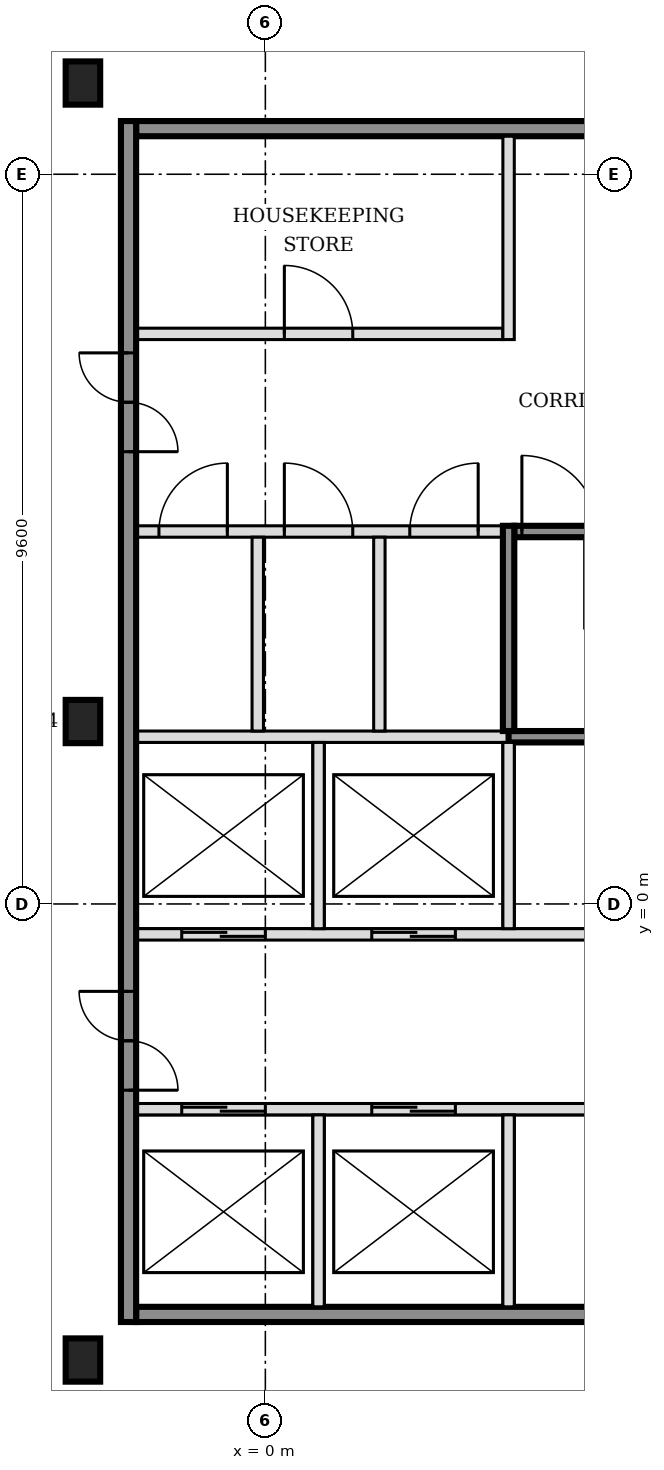
"""IFC4 building model, lengths in metres.
Left out: names, types, materials, properties, quantities, classifications, styles, units other than length and angle.
Written with IfcOpenShell. Run it as: python <this file> out.ifc"""

import sys

from ifc_helpers import new_model, si_unit, direction, frame, frame_2d, origin, origin_2d, place, context, subcontext, project, spatial, rectangle, i_section, extrude, element, fill, save


model = new_model("IFC4")
c1 = context("Model", 3, precision=1e-05, world=origin(), true_north=direction((0.0, 1.0)))
c2 = subcontext(c1, "Body", "Model", "MODEL_VIEW")
j1 = project(units=[si_unit("LENGTHUNIT", "METRE"), si_unit("PLANEANGLEUNIT", "RADIAN")], contexts=[c1])
p1 = place(None, origin())
s1 = spatial("IfcSite", under=j1, at=p1, CompositionType="ELEMENT")
p2 = place(p1, origin())
s2 = spatial("IfcBuilding", under=s1, at=p2, CompositionType="ELEMENT")
p3 = place(p2, frame((0.0, 0.0, 30.6)))
s3 = spatial("IfcBuildingStorey", under=s2, at=p3, CompositionType="ELEMENT", Elevation=30.6)
for number, where, z_axis, x_axis in (
    (1, (-2.4, -6.0, -0.2), (0.0, 0.0, 1.0), (1.0, 0.0, 0.0)),
    (2, (-2.4, 2.4, -0.2), (0.0, 0.0, 1.0), (1.0, 0.0, 0.0)),
    (3, (-2.4, 10.8, -0.2), (0.0, 0.0, 1.0), (1.0, 0.0, 0.0)),
):
    element("IfcColumn", number, at=place(p3, frame(where, z_axis=z_axis, x_axis=x_axis)), inside=s3, PredefinedType="COLUMN", context=c2, shape_type="SweptSolid", body=[
        extrude(i_section(OverallWidth=0.454, OverallDepth=0.569, WebThickness=0.078, FlangeThickness=0.125, FilletRadius=0.015, at=origin_2d()), origin(), (0.0, 0.0, 1.0), 4.8),
    ])
p4 = place(p3, frame((-1.7, -5.4, 0.0), z_axis=(0.0, 0.0, 1.0), x_axis=(1.0, 0.0, 0.0)))
e4 = element("IfcWall", 4, at=p4, inside=s3, PredefinedType="SOLIDWALL", context=c2, shape_type="SweptSolid", body=[
    extrude(rectangle(XDim=7.9, YDim=0.2, at=frame_2d((3.95, 0.0))), origin(), (0.0, 0.0, 1.0), 4.6),
])
p5 = place(p3, frame((-1.7, -2.7, 0.0), z_axis=(0.0, 0.0, 1.0), x_axis=(1.0, 0.0, 0.0)))
e5 = element("IfcWall", 5, at=p5, inside=s3, PredefinedType="SOLIDWALL", context=c2, shape_type="SweptSolid", body=[
    extrude(rectangle(XDim=7.9, YDim=0.15, at=frame_2d((3.95, 0.0))), origin(), (0.0, 0.0, 1.0), 4.6),
])
p6 = place(p5, frame((0.6, 0.0, 0.0)))
e6 = element("IfcOpeningElement", 6, at=p6, cuts=e5, PredefinedType="OPENING", context=c2, shape_type="SweptSolid", body=[
    extrude(rectangle(XDim=1.1, YDim=2.1, at=frame_2d((0.55, 1.05))), frame((0.0, 0.085, 0.0), z_axis=(0.0, -1.0, 0.0), x_axis=(1.0, 0.0, 0.0)), (0.0, 0.0, 1.0), 0.17),
])
p7 = place(p5, frame((3.1, 0.0, 0.0)))
e7 = element("IfcOpeningElement", 7, at=p7, cuts=e5, PredefinedType="OPENING", context=c2, shape_type="SweptSolid", body=[
    extrude(rectangle(XDim=1.1, YDim=2.1, at=frame_2d((0.55, 1.05))), frame((0.0, 0.085, 0.0), z_axis=(0.0, -1.0, 0.0), x_axis=(1.0, 0.0, 0.0)), (0.0, 0.0, 1.0), 0.17),
])
p8 = place(p3, frame((-1.7, -0.4, 0.0), z_axis=(0.0, 0.0, 1.0), x_axis=(1.0, 0.0, 0.0)))
e8 = element("IfcWall", 8, at=p8, inside=s3, PredefinedType="SOLIDWALL", context=c2, shape_type="SweptSolid", body=[
    extrude(rectangle(XDim=15.925, YDim=0.15, at=frame_2d((7.962, 0.0))), origin(), (0.0, 0.0, 1.0), 4.6),
])
p9 = place(p8, frame((0.6, 0.0, 0.0)))
e9 = element("IfcOpeningElement", 9, at=p9, cuts=e8, PredefinedType="OPENING", context=c2, shape_type="SweptSolid", body=[
    extrude(rectangle(XDim=1.1, YDim=2.1, at=frame_2d((0.55, 1.05))), frame((0.0, 0.085, 0.0), z_axis=(0.0, -1.0, 0.0), x_axis=(1.0, 0.0, 0.0)), (0.0, 0.0, 1.0), 0.17),
])
p10 = place(p8, frame((3.1, 0.0, 0.0)))
e10 = element("IfcOpeningElement", 10, at=p10, cuts=e8, PredefinedType="OPENING", context=c2, shape_type="SweptSolid", body=[
    extrude(rectangle(XDim=1.1, YDim=2.1, at=frame_2d((0.55, 1.05))), frame((0.0, 0.085, 0.0), z_axis=(0.0, -1.0, 0.0), x_axis=(1.0, 0.0, 0.0)), (0.0, 0.0, 1.0), 0.17),
])
p11 = place(p8, frame((11.575, 0.0, 0.0)))
e11 = element("IfcOpeningElement", 11, at=p11, cuts=e8, PredefinedType="OPENING", context=c2, shape_type="SweptSolid", body=[
    extrude(rectangle(XDim=1.2, YDim=2.1, at=frame_2d((0.6, 1.05))), frame((0.0, 0.085, 0.0), z_axis=(0.0, -1.0, 0.0), x_axis=(1.0, 0.0, 0.0)), (0.0, 0.0, 1.0), 0.17),
])
p12 = place(p8, frame((14.125, 0.0, 0.0)))
e12 = element("IfcOpeningElement", 12, at=p12, cuts=e8, PredefinedType="OPENING", context=c2, shape_type="SweptSolid", body=[
    extrude(rectangle(XDim=1.2, YDim=2.1, at=frame_2d((0.6, 1.05))), frame((0.0, 0.085, 0.0), z_axis=(0.0, -1.0, 0.0), x_axis=(1.0, 0.0, 0.0)), (0.0, 0.0, 1.0), 0.17),
])
p13 = place(p3, frame((-1.7, 2.2, 0.0), z_axis=(0.0, 0.0, 1.0), x_axis=(1.0, 0.0, 0.0)))
e13 = element("IfcWall", 13, at=p13, inside=s3, PredefinedType="SOLIDWALL", context=c2, shape_type="SweptSolid", body=[
    extrude(rectangle(XDim=4.9, YDim=0.15, at=frame_2d((2.45, 0.0))), origin(), (0.0, 0.0, 1.0), 4.6),
])
p14 = place(p3, frame((3.2, 2.2, 0.0), z_axis=(0.0, 0.0, 1.0), x_axis=(1.0, 0.0, 0.0)))
e14 = element("IfcWall", 14, at=p14, inside=s3, PredefinedType="SOLIDWALL", context=c2, shape_type="SweptSolid", body=[
    extrude(rectangle(XDim=6.5, YDim=0.15, at=frame_2d((3.25, 0.0))), origin(), (0.0, 0.0, 1.0), 4.6),
])
p15 = place(p3, frame((-1.7, 4.9, 0.0), z_axis=(0.0, 0.0, 1.0), x_axis=(1.0, 0.0, 0.0)))
e15 = element("IfcWall", 15, at=p15, inside=s3, PredefinedType="PARTITIONING", context=c2, shape_type="SweptSolid", body=[
    extrude(rectangle(XDim=4.825, YDim=0.15, at=frame_2d((2.413, 0.0))), origin(), (0.0, 0.0, 1.0), 4.6),
])
p16 = place(p15, frame((0.3, 0.0, 0.0)))
e16 = element("IfcOpeningElement", 16, at=p16, cuts=e15, PredefinedType="OPENING", context=c2, shape_type="SweptSolid", body=[
    extrude(rectangle(XDim=0.9, YDim=2.1, at=frame_2d((0.45, 1.05))), frame((0.0, 0.085, 0.0), z_axis=(0.0, -1.0, 0.0), x_axis=(1.0, 0.0, 0.0)), (0.0, 0.0, 1.0), 0.17),
])
p17 = place(p15, frame((1.95, 0.0, 0.0)))
e17 = element("IfcOpeningElement", 17, at=p17, cuts=e15, PredefinedType="OPENING", context=c2, shape_type="SweptSolid", body=[
    extrude(rectangle(XDim=0.9, YDim=2.1, at=frame_2d((0.45, 1.05))), frame((0.0, 0.085, 0.0), z_axis=(0.0, -1.0, 0.0), x_axis=(1.0, 0.0, 0.0)), (0.0, 0.0, 1.0), 0.17),
])
p18 = place(p15, frame((3.6, 0.0, 0.0)))
e18 = element("IfcOpeningElement", 18, at=p18, cuts=e15, PredefinedType="OPENING", context=c2, shape_type="SweptSolid", body=[
    extrude(rectangle(XDim=0.9, YDim=2.1, at=frame_2d((0.45, 1.05))), frame((0.0, 0.085, 0.0), z_axis=(0.0, -1.0, 0.0), x_axis=(1.0, 0.0, 0.0)), (0.0, 0.0, 1.0), 0.17),
])
p19 = place(p3, frame((3.275, 4.9, 0.0), z_axis=(0.0, 0.0, 1.0), x_axis=(1.0, 0.0, 0.0)))
e19 = element("IfcWall", 19, at=p19, inside=s3, PredefinedType="SOLIDWALL", context=c2, shape_type="SweptSolid", body=[
    extrude(rectangle(XDim=6.425, YDim=0.15, at=frame_2d((3.212, 0.0))), origin(), (0.0, 0.0, 1.0), 4.6),
])
p20 = place(p19, frame((0.1, 0.0, 0.0)))
e20 = element("IfcOpeningElement", 20, at=p20, cuts=e19, PredefinedType="OPENING", context=c2, shape_type="SweptSolid", body=[
    extrude(rectangle(XDim=1.0, YDim=2.1, at=frame_2d((0.5, 1.05))), frame((0.0, 0.085, 0.0), z_axis=(0.0, -1.0, 0.0), x_axis=(1.0, 0.0, 0.0)), (0.0, 0.0, 1.0), 0.17),
])
p21 = place(p3, frame((-1.7, 7.5, 0.0), z_axis=(0.0, 0.0, 1.0), x_axis=(1.0, 0.0, 0.0)))
e21 = element("IfcWall", 21, at=p21, inside=s3, PredefinedType="PARTITIONING", context=c2, shape_type="SweptSolid", body=[
    extrude(rectangle(XDim=4.825, YDim=0.15, at=frame_2d((2.413, 0.0))), origin(), (0.0, 0.0, 1.0), 4.6),
])
p22 = place(p21, frame((1.95, 0.0, 0.0)))
e22 = element("IfcOpeningElement", 22, at=p22, cuts=e21, PredefinedType="OPENING", context=c2, shape_type="SweptSolid", body=[
    extrude(rectangle(XDim=0.9, YDim=2.1, at=frame_2d((0.45, 1.05))), frame((0.0, 0.085, 0.0), z_axis=(0.0, -1.0, 0.0), x_axis=(1.0, 0.0, 0.0)), (0.0, 0.0, 1.0), 0.17),
])
p23 = place(p3, frame((-1.7, 10.2, 0.0), z_axis=(0.0, 0.0, 1.0), x_axis=(1.0, 0.0, 0.0)))
e23 = element("IfcWall", 23, at=p23, inside=s3, PredefinedType="SOLIDWALL", context=c2, shape_type="SweptSolid", body=[
    extrude(rectangle(XDim=7.9, YDim=0.2, at=frame_2d((3.95, 0.0))), origin(), (0.0, 0.0, 1.0), 4.6),
])
p24 = place(p3, frame((-1.8, -5.5, 0.0), z_axis=(0.0, 0.0, 1.0), x_axis=(0.0, 1.0, 0.0)))
e24 = element("IfcWall", 24, at=p24, inside=s3, PredefinedType="SOLIDWALL", context=c2, shape_type="SweptSolid", body=[
    extrude(rectangle(XDim=15.8, YDim=0.2, at=frame_2d((7.9, 0.0))), origin(), (0.0, 0.0, 1.0), 4.6),
])
p25 = place(p24, frame((3.05, 0.0, 0.0)))
e25 = element("IfcOpeningElement", 25, at=p25, cuts=e24, PredefinedType="OPENING", context=c2, shape_type="SweptSolid", body=[
    extrude(rectangle(XDim=1.3, YDim=2.1, at=frame_2d((0.65, 1.05))), frame((0.0, 0.11, 0.0), z_axis=(0.0, -1.0, 0.0), x_axis=(1.0, 0.0, 0.0)), (0.0, 0.0, 1.0), 0.22),
])
p26 = place(p24, frame((11.45, 0.0, 0.0)))
e26 = element("IfcOpeningElement", 26, at=p26, cuts=e24, PredefinedType="OPENING", context=c2, shape_type="SweptSolid", body=[
    extrude(rectangle(XDim=1.3, YDim=2.1, at=frame_2d((0.65, 1.05))), frame((0.0, 0.11, 0.0), z_axis=(0.0, -1.0, 0.0), x_axis=(1.0, 0.0, 0.0)), (0.0, 0.0, 1.0), 0.22),
])
p27 = place(p3, frame((-0.1, 2.275, 0.0), z_axis=(0.0, 0.0, 1.0), x_axis=(0.0, 1.0, 0.0)))
e27 = element("IfcWall", 27, at=p27, inside=s3, PredefinedType="PARTITIONING", context=c2, shape_type="SweptSolid", body=[
    extrude(rectangle(XDim=2.55, YDim=0.15, at=frame_2d((1.275, 0.0))), origin(), (0.0, 0.0, 1.0), 4.6),
])
p28 = place(p3, frame((0.7, -5.3, 0.0), z_axis=(0.0, 0.0, 1.0), x_axis=(0.0, 1.0, 0.0)))
e28 = element("IfcWall", 28, at=p28, inside=s3, PredefinedType="SOLIDWALL", context=c2, shape_type="SweptSolid", body=[
    extrude(rectangle(XDim=2.525, YDim=0.15, at=frame_2d((1.263, 0.0))), origin(), (0.0, 0.0, 1.0), 4.6),
])
p29 = place(p3, frame((0.7, -0.325, 0.0), z_axis=(0.0, 0.0, 1.0), x_axis=(0.0, 1.0, 0.0)))
e29 = element("IfcWall", 29, at=p29, inside=s3, PredefinedType="SOLIDWALL", context=c2, shape_type="SweptSolid", body=[
    extrude(rectangle(XDim=2.45, YDim=0.15, at=frame_2d((1.225, 0.0))), origin(), (0.0, 0.0, 1.0), 4.6),
])
p30 = place(p3, frame((1.5, 2.275, 0.0), z_axis=(0.0, 0.0, 1.0), x_axis=(0.0, 1.0, 0.0)))
e30 = element("IfcWall", 30, at=p30, inside=s3, PredefinedType="PARTITIONING", context=c2, shape_type="SweptSolid", body=[
    extrude(rectangle(XDim=2.55, YDim=0.15, at=frame_2d((1.275, 0.0))), origin(), (0.0, 0.0, 1.0), 4.6),
])
p31 = place(p3, frame((3.2, -5.3, 0.0), z_axis=(0.0, 0.0, 1.0), x_axis=(0.0, 1.0, 0.0)))
e31 = element("IfcWall", 31, at=p31, inside=s3, PredefinedType="SOLIDWALL", context=c2, shape_type="SweptSolid", body=[
    extrude(rectangle(XDim=2.525, YDim=0.15, at=frame_2d((1.263, 0.0))), origin(), (0.0, 0.0, 1.0), 4.6),
])
p32 = place(p3, frame((3.2, -0.325, 0.0), z_axis=(0.0, 0.0, 1.0), x_axis=(0.0, 1.0, 0.0)))
e32 = element("IfcWall", 32, at=p32, inside=s3, PredefinedType="SOLIDWALL", context=c2, shape_type="SweptSolid", body=[
    extrude(rectangle(XDim=2.45, YDim=0.15, at=frame_2d((1.225, 0.0))), origin(), (0.0, 0.0, 1.0), 4.6),
])
p33 = place(p3, frame((3.2, 2.275, 0.0), z_axis=(0.0, 0.0, 1.0), x_axis=(0.0, 1.0, 0.0)))
e33 = element("IfcWall", 33, at=p33, inside=s3, PredefinedType="SOLIDWALL", context=c2, shape_type="SweptSolid", body=[
    extrude(rectangle(XDim=2.7, YDim=0.15, at=frame_2d((1.35, 0.0))), origin(), (0.0, 0.0, 1.0), 4.6),
])
p34 = place(p3, frame((3.2, 7.425, 0.0), z_axis=(0.0, 0.0, 1.0), x_axis=(0.0, 1.0, 0.0)))
e34 = element("IfcWall", 34, at=p34, inside=s3, PredefinedType="PARTITIONING", context=c2, shape_type="SweptSolid", body=[
    extrude(rectangle(XDim=2.675, YDim=0.15, at=frame_2d((1.337, 0.0))), origin(), (0.0, 0.0, 1.0), 4.6),
])
p35 = place(p6, origin())
e35 = element("IfcDoor", 35, at=p35, inside=s3, OperationType="DOUBLE_DOOR_SLIDING", PredefinedType="DOOR", context=c2, shape_type="SweptSolid", body=[
    extrude(rectangle(XDim=1.1, YDim=2.1, at=frame_2d((0.55, 1.05))), frame((0.0, 0.025, 0.0), z_axis=(0.0, -1.0, 0.0), x_axis=(1.0, 0.0, 0.0)), (0.0, 0.0, 1.0), 0.05),
])
fill(e6, e35)
p36 = place(p7, origin())
e36 = element("IfcDoor", 36, at=p36, inside=s3, OperationType="DOUBLE_DOOR_SLIDING", PredefinedType="DOOR", context=c2, shape_type="SweptSolid", body=[
    extrude(rectangle(XDim=1.1, YDim=2.1, at=frame_2d((0.55, 1.05))), frame((0.0, 0.025, 0.0), z_axis=(0.0, -1.0, 0.0), x_axis=(1.0, 0.0, 0.0)), (0.0, 0.0, 1.0), 0.05),
])
fill(e7, e36)
p37 = place(p9, origin())
e37 = element("IfcDoor", 37, at=p37, inside=s3, OperationType="DOUBLE_DOOR_SLIDING", PredefinedType="DOOR", context=c2, shape_type="SweptSolid", body=[
    extrude(rectangle(XDim=1.1, YDim=2.1, at=frame_2d((0.55, 1.05))), frame((0.0, 0.025, 0.0), z_axis=(0.0, -1.0, 0.0), x_axis=(1.0, 0.0, 0.0)), (0.0, 0.0, 1.0), 0.05),
])
fill(e9, e37)
p38 = place(p10, origin())
e38 = element("IfcDoor", 38, at=p38, inside=s3, OperationType="DOUBLE_DOOR_SLIDING", PredefinedType="DOOR", context=c2, shape_type="SweptSolid", body=[
    extrude(rectangle(XDim=1.1, YDim=2.1, at=frame_2d((0.55, 1.05))), frame((0.0, 0.025, 0.0), z_axis=(0.0, -1.0, 0.0), x_axis=(1.0, 0.0, 0.0)), (0.0, 0.0, 1.0), 0.05),
])
fill(e10, e38)
p39 = place(p20, origin())
e39 = element("IfcDoor", 39, at=p39, inside=s3, OperationType="SINGLE_SWING_LEFT", PredefinedType="DOOR", context=c2, shape_type="SweptSolid", body=[
    extrude(rectangle(XDim=1.0, YDim=2.1, at=frame_2d((0.5, 1.05))), frame((0.0, 0.025, 0.0), z_axis=(0.0, -1.0, 0.0), x_axis=(1.0, 0.0, 0.0)), (0.0, 0.0, 1.0), 0.05),
])
fill(e20, e39)
p40 = place(p25, origin())
e40 = element("IfcDoor", 40, at=p40, inside=s3, OperationType="DOUBLE_DOOR_SINGLE_SWING", PredefinedType="DOOR", context=c2, shape_type="SweptSolid", body=[
    extrude(rectangle(XDim=1.3, YDim=2.1, at=frame_2d((0.65, 1.05))), frame((0.0, 0.025, 0.0), z_axis=(0.0, -1.0, 0.0), x_axis=(1.0, 0.0, 0.0)), (0.0, 0.0, 1.0), 0.05),
])
fill(e25, e40)
p41 = place(p26, origin())
e41 = element("IfcDoor", 41, at=p41, inside=s3, OperationType="DOUBLE_DOOR_SINGLE_SWING", PredefinedType="DOOR", context=c2, shape_type="SweptSolid", body=[
    extrude(rectangle(XDim=1.3, YDim=2.1, at=frame_2d((0.65, 1.05))), frame((0.0, 0.025, 0.0), z_axis=(0.0, -1.0, 0.0), x_axis=(1.0, 0.0, 0.0)), (0.0, 0.0, 1.0), 0.05),
])
fill(e26, e41)
p42 = place(p16, origin())
e42 = element("IfcDoor", 42, at=p42, inside=s3, OperationType="SINGLE_SWING_RIGHT", PredefinedType="DOOR", context=c2, shape_type="SweptSolid", body=[
    extrude(rectangle(XDim=0.9, YDim=2.1, at=frame_2d((0.45, 1.05))), frame((0.0, 0.025, 0.0), z_axis=(0.0, -1.0, 0.0), x_axis=(1.0, 0.0, 0.0)), (0.0, 0.0, 1.0), 0.05),
])
fill(e16, e42)
p43 = place(p17, origin())
e43 = element("IfcDoor", 43, at=p43, inside=s3, OperationType="SINGLE_SWING_LEFT", PredefinedType="DOOR", context=c2, shape_type="SweptSolid", body=[
    extrude(rectangle(XDim=0.9, YDim=2.1, at=frame_2d((0.45, 1.05))), frame((0.0, 0.025, 0.0), z_axis=(0.0, -1.0, 0.0), x_axis=(1.0, 0.0, 0.0)), (0.0, 0.0, 1.0), 0.05),
])
fill(e17, e43)
p44 = place(p18, origin())
e44 = element("IfcDoor", 44, at=p44, inside=s3, OperationType="SINGLE_SWING_RIGHT", PredefinedType="DOOR", context=c2, shape_type="SweptSolid", body=[
    extrude(rectangle(XDim=0.9, YDim=2.1, at=frame_2d((0.45, 1.05))), frame((0.0, 0.025, 0.0), z_axis=(0.0, -1.0, 0.0), x_axis=(1.0, 0.0, 0.0)), (0.0, 0.0, 1.0), 0.05),
])
fill(e18, e44)
p45 = place(p22, origin())
e45 = element("IfcDoor", 45, at=p45, inside=s3, OperationType="SINGLE_SWING_LEFT", PredefinedType="DOOR", context=c2, shape_type="SweptSolid", body=[
    extrude(rectangle(XDim=0.9, YDim=2.1, at=frame_2d((0.45, 1.05))), frame((0.0, 0.025, 0.0), z_axis=(0.0, -1.0, 0.0), x_axis=(1.0, 0.0, 0.0)), (0.0, 0.0, 1.0), 0.05),
])
fill(e22, e45)
save(model, sys.argv[1])
